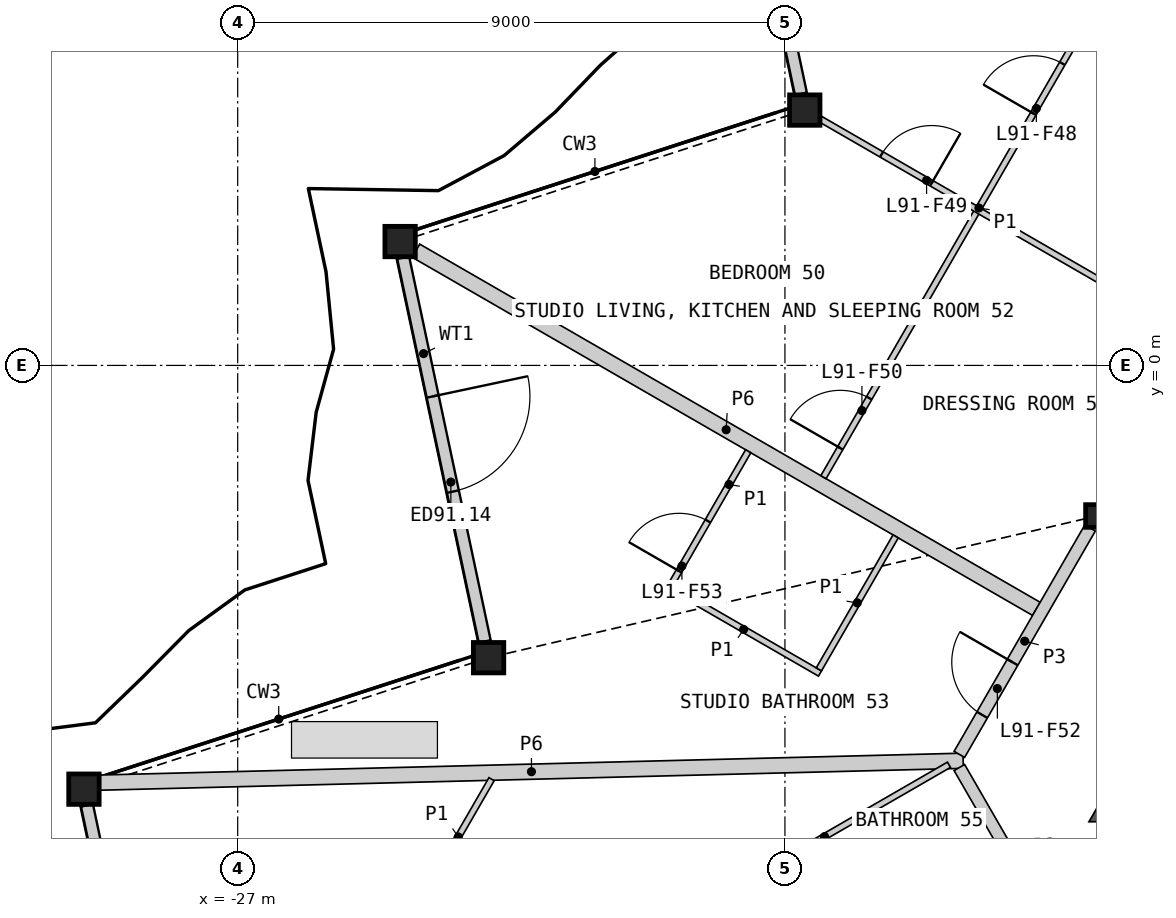
"""IFC4 building model, lengths in metres.
Left out: names, types, materials, properties, quantities, classifications, styles, units other than length and angle.
Written with IfcOpenShell. Run it as: python <this file> out.ifc"""

import sys

from ifc_helpers import new_model, si_unit, direction, frame, frame_2d, origin, origin_2d, place, context, subcontext, project, spatial, polyline, rectangle, hollow_rectangle, i_section, outline, extrude, element, fill, save


model = new_model("IFC4")
c1 = context("Model", 3, precision=1e-05, world=origin(), true_north=direction((0.0, 1.0)))
c2 = subcontext(c1, "Body", "Model", "MODEL_VIEW")
j1 = project(units=[si_unit("LENGTHUNIT", "METRE"), si_unit("PLANEANGLEUNIT", "RADIAN")], contexts=[c1])
p1 = place(None, origin())
s1 = spatial("IfcSite", under=j1, at=p1, CompositionType="ELEMENT")
p2 = place(p1, origin())
s2 = spatial("IfcBuilding", under=s1, at=p2, CompositionType="ELEMENT")
p3 = place(p2, frame((0.0, 0.0, 398.4)))
s3 = spatial("IfcBuildingStorey", under=s2, at=p3, CompositionType="ELEMENT", Elevation=398.4)
for number, where, z_axis, x_axis in (
    (1, (-17.674, 4.199, 0.0), (0.0, 0.0, 1.0), (1.0, 0.0, 0.0)),
    (2, (-24.329, 2.037, 0.0), (0.0, 0.0, 1.0), (1.0, 0.0, 0.0)),
    (3, (-22.874, -4.807, 0.0), (0.0, 0.0, 1.0), (1.0, 0.0, 0.0)),
    (4, (-29.529, -6.969, 0.0), (0.0, 0.0, 1.0), (1.0, 0.0, 0.0)),
):
    element("IfcColumn", number, at=place(p3, frame(where, z_axis=z_axis, x_axis=x_axis)), inside=s3, PredefinedType="COLUMN", context=c2, shape_type="SweptSolid", body=[
        extrude(hollow_rectangle(XDim=0.5, YDim=0.5, WallThickness=0.03, at=origin_2d()), origin(), (0.0, 0.0, 1.0), 3.4),
    ])
p4 = place(p3, frame((-12.868, -2.476, 0.0), z_axis=(0.0, 0.0, 1.0), x_axis=(1.0, 0.0, 0.0)))
e5 = element("IfcColumn", 5, at=p4, inside=s3, PredefinedType="COLUMN", context=c2, shape_type="SweptSolid", body=[
    extrude(i_section(OverallWidth=0.374, OverallDepth=0.372, WebThickness=0.016, FlangeThickness=0.026, at=origin_2d()), origin(), (0.0, 0.0, 1.0), 3.4),
])
p5 = place(p3, frame((-19.079, 10.778, 0.0), z_axis=(0.0, 0.0, 1.0), x_axis=(0.207888166349, -0.978152600718, 0.0)))
e6 = element("IfcWall", 6, at=p5, inside=s3, PredefinedType="SOLIDWALL", context=c2, shape_type="SweptSolid", body=[
    extrude(rectangle(XDim=6.453, YDim=0.2, at=frame_2d((3.227, 0.0))), origin(), (0.0, 0.0, 1.0), 2.634),
])
p6 = place(p5, frame((2.333, 0.0, 0.0)))
e7 = element("IfcOpeningElement", 7, at=p6, cuts=e6, PredefinedType="OPENING", context=c2, shape_type="SweptSolid", body=[
    extrude(rectangle(XDim=1.6, YDim=2.25, at=frame_2d((0.8, 1.125))), frame((0.0, 0.11, 0.0), z_axis=(0.0, -1.0, 0.0), x_axis=(1.0, 0.0, 0.0)), (0.0, 0.0, 1.0), 0.22),
])
p7 = place(p3, frame((-24.279, 1.772, 0.0), z_axis=(0.0, 0.0, 1.0), x_axis=(0.207924363149, -0.978144907061, 0.0)))
e8 = element("IfcWall", 8, at=p7, inside=s3, PredefinedType="SOLIDWALL", context=c2, shape_type="SweptSolid", body=[
    extrude(rectangle(XDim=6.453, YDim=0.2, at=frame_2d((3.227, 0.0))), origin(), (0.0, 0.0, 1.0), 2.634),
])
p8 = place(p7, frame((2.333, 0.0, 0.0)))
e9 = element("IfcOpeningElement", 9, at=p8, cuts=e8, PredefinedType="OPENING", context=c2, shape_type="SweptSolid", body=[
    extrude(rectangle(XDim=1.6, YDim=2.25, at=frame_2d((0.8, 1.125))), frame((0.0, 0.11, 0.0), z_axis=(0.0, -1.0, 0.0), x_axis=(1.0, 0.0, 0.0)), (0.0, 0.0, 1.0), 0.22),
])
p9 = place(p3, frame((-29.479, -7.235, 0.0), z_axis=(0.0, 0.0, 1.0), x_axis=(0.207932057694, -0.978143271399, 0.0)))
e10 = element("IfcWall", 10, at=p9, inside=s3, PredefinedType="SOLIDWALL", context=c2, shape_type="SweptSolid", body=[
    extrude(rectangle(XDim=6.453, YDim=0.2, at=frame_2d((3.227, 0.0))), origin(), (0.0, 0.0, 1.0), 2.634),
])
p10 = place(p9, frame((2.333, 0.0, 0.0)))
e11 = element("IfcOpeningElement", 11, at=p10, cuts=e10, PredefinedType="OPENING", context=c2, shape_type="SweptSolid", body=[
    extrude(rectangle(XDim=1.6, YDim=2.25, at=frame_2d((0.8, 1.125))), frame((0.0, 0.11, 0.0), z_axis=(0.0, -1.0, 0.0), x_axis=(1.0, 0.0, 0.0)), (0.0, 0.0, 1.0), 0.22),
])
p11 = place(p3, origin())
e12 = element("IfcWall", 12, at=p11, inside=s3, PredefinedType="SHEAR", context=c2, shape_type="SweptSolid", body=[
    extrude(outline(polyline([(-12.48, -6.606), (-11.961, -6.906), (-11.961, -7.506), (-13.0, -7.506), (-12.48, -6.606)])), origin(), (0.0, 0.0, 1.0), 3.1),
])
p12 = place(p3, frame((-29.269, -6.862, 0.0), z_axis=(0.0, 0.0, 1.0), x_axis=(0.999679020594, 0.025334872878, 0.0)))
e13 = element("IfcWall", 13, at=p12, inside=s3, PredefinedType="PARTITIONING", context=c2, shape_type="SweptSolid", body=[
    extrude(rectangle(XDim=14.204, YDim=0.25, at=frame_2d((7.102, 0.0))), origin(), (0.0, 0.0, 1.0), 2.33),
])
p13 = place(p3, frame((-24.069, 1.887, 0.0), z_axis=(0.0, 0.0, 1.0), x_axis=(0.866023404247, -0.500003463284, 0.0)))
e14 = element("IfcWall", 14, at=p13, inside=s3, PredefinedType="PARTITIONING", context=c2, shape_type="SweptSolid", body=[
    extrude(rectangle(XDim=11.782, YDim=0.25, at=frame_2d((5.891, 0.0))), origin(), (0.0, 0.0, 1.0), 2.33),
])
p14 = place(p3, frame((-15.131, -6.397, 0.0), z_axis=(0.0, 0.0, 1.0), x_axis=(0.499986217557, 0.866033360935, 0.0)))
e15 = element("IfcWall", 15, at=p14, inside=s3, PredefinedType="PARTITIONING", context=c2, shape_type="SweptSolid", body=[
    extrude(rectangle(XDim=4.3, YDim=0.2, at=frame_2d((2.15, 0.0))), origin(), (0.0, 0.0, 1.0), 3.1),
])
p15 = place(p14, frame((0.75, 0.0, 0.0)))
e16 = element("IfcOpeningElement", 16, at=p15, cuts=e15, PredefinedType="OPENING", context=c2, shape_type="SweptSolid", body=[
    extrude(rectangle(XDim=1.0, YDim=2.1, at=frame_2d((0.5, 1.05))), frame((0.0, 0.11, 0.0), z_axis=(0.0, -1.0, 0.0), x_axis=(1.0, 0.0, 0.0)), (0.0, 0.0, 1.0), 0.22),
])
p16 = place(p3, frame((-15.131, -6.614, 0.0), z_axis=(0.0, 0.0, 1.0), x_axis=(0.499967746641, -0.866044024469, 0.0)))
e17 = element("IfcWall", 17, at=p16, inside=s3, PredefinedType="PARTITIONING", context=c2, shape_type="SweptSolid", body=[
    extrude(rectangle(XDim=3.676, YDim=0.2, at=frame_2d((1.838, 0.0))), origin(), (0.0, 0.0, 1.0), 3.1),
])
p17 = place(p16, frame((2.426, 0.0, 0.0)))
e18 = element("IfcOpeningElement", 18, at=p17, cuts=e17, PredefinedType="OPENING", context=c2, shape_type="SweptSolid", body=[
    extrude(rectangle(XDim=1.0, YDim=2.1, at=frame_2d((0.5, 1.05))), frame((0.0, 0.11, 0.0), z_axis=(0.0, -1.0, 0.0), x_axis=(1.0, 0.0, 0.0)), (0.0, 0.0, 1.0), 0.22),
])
p18 = place(p3, frame((-18.869, 10.894, 0.0), z_axis=(0.0, 0.0, 1.0), x_axis=(0.866023724155, -0.500002909193, 0.0)))
e19 = element("IfcWall", 19, at=p18, inside=s3, PredefinedType="PARTITIONING", context=c2, shape_type="SweptSolid", body=[
    extrude(rectangle(XDim=11.655, YDim=0.1, at=frame_2d((5.827, 0.0))), origin(), (0.0, 0.0, 1.0), 2.33),
])
p19 = place(p18, frame((6.453, 0.0, 0.0)))
e20 = element("IfcOpeningElement", 20, at=p19, cuts=e19, PredefinedType="OPENING", context=c2, shape_type="SweptSolid", body=[
    extrude(rectangle(XDim=0.95, YDim=2.1, at=frame_2d((0.475, 1.05))), frame((0.0, 0.06, 0.0), z_axis=(0.0, -1.0, 0.0), x_axis=(1.0, 0.0, 0.0)), (0.0, 0.0, 1.0), 0.12),
])
p20 = place(p3, frame((-17.366, -1.838, 0.0), z_axis=(0.0, 0.0, 1.0), x_axis=(0.499998717582, 0.866026144187, 0.0)))
e21 = element("IfcWall", 21, at=p20, inside=s3, PredefinedType="PARTITIONING", context=c2, shape_type="SweptSolid", body=[
    extrude(rectangle(XDim=10.225, YDim=0.1, at=frame_2d((5.113, 0.0))), origin(), (0.0, 0.0, 1.0), 2.33),
])
p21 = place(p20, frame((6.907, 0.0, 0.0)))
e22 = element("IfcOpeningElement", 22, at=p21, cuts=e21, PredefinedType="OPENING", context=c2, shape_type="SweptSolid", body=[
    extrude(rectangle(XDim=0.95, YDim=2.1, at=frame_2d((0.475, 1.05))), frame((0.0, 0.06, 0.0), z_axis=(0.0, -1.0, 0.0), x_axis=(1.0, 0.0, 0.0)), (0.0, 0.0, 1.0), 0.12),
])
p22 = place(p20, frame((0.552, 0.0, 0.0)))
e23 = element("IfcOpeningElement", 23, at=p22, cuts=e21, PredefinedType="OPENING", context=c2, shape_type="SweptSolid", body=[
    extrude(rectangle(XDim=0.95, YDim=2.1, at=frame_2d((0.475, 1.05))), frame((0.0, 0.06, 0.0), z_axis=(0.0, -1.0, 0.0), x_axis=(1.0, 0.0, 0.0)), (0.0, 0.0, 1.0), 0.12),
])
p23 = place(p3, frame((-17.414, 4.049, 0.0), z_axis=(0.0, 0.0, 1.0), x_axis=(0.866033839264, -0.499985389037, 0.0)))
e24 = element("IfcWall", 24, at=p23, inside=s3, PredefinedType="PARTITIONING", context=c2, shape_type="SweptSolid", body=[
    extrude(rectangle(XDim=7.1, YDim=0.1, at=frame_2d((3.55, 0.0))), origin(), (0.0, 0.0, 1.0), 2.33),
])
p24 = place(p23, frame((1.158, 0.0, 0.0)))
e25 = element("IfcOpeningElement", 25, at=p24, cuts=e24, PredefinedType="OPENING", context=c2, shape_type="SweptSolid", body=[
    extrude(rectangle(XDim=0.95, YDim=2.1, at=frame_2d((0.475, 1.05))), frame((0.0, 0.06, 0.0), z_axis=(0.0, -1.0, 0.0), x_axis=(1.0, 0.0, 0.0)), (0.0, 0.0, 1.0), 0.12),
])
p25 = place(p3, frame((-19.935, -3.617, 0.0), z_axis=(0.0, 0.0, 1.0), x_axis=(0.866032775405, -0.499987231761, 0.0)))
e26 = element("IfcWall", 26, at=p25, inside=s3, PredefinedType="PARTITIONING", context=c2, shape_type="SweptSolid", body=[
    extrude(rectangle(XDim=2.9, YDim=0.1, at=frame_2d((1.45, 0.0))), origin(), (0.0, 0.0, 1.0), 2.33),
])
p26 = place(p3, frame((-17.442, -4.999, 0.0), z_axis=(0.0, 0.0, 1.0), x_axis=(0.499976333282, 0.866039067339, 0.0)))
e27 = element("IfcWall", 27, at=p26, inside=s3, PredefinedType="PARTITIONING", context=c2, shape_type="SweptSolid", body=[
    extrude(rectangle(XDim=2.525, YDim=0.1, at=frame_2d((1.262, 0.0))), origin(), (0.0, 0.0, 1.0), 2.33),
])
p27 = place(p3, frame((-19.867, -3.599, 0.0), z_axis=(0.0, 0.0, 1.0), x_axis=(0.500048846702, 0.865997200291, 0.0)))
e28 = element("IfcWall", 28, at=p27, inside=s3, PredefinedType="PARTITIONING", context=c2, shape_type="SweptSolid", body=[
    extrude(rectangle(XDim=2.525, YDim=0.1, at=frame_2d((1.263, 0.0))), origin(), (0.0, 0.0, 1.0), 2.33),
])
p28 = place(p27, frame((0.25, 0.0, 0.0)))
e29 = element("IfcOpeningElement", 29, at=p28, cuts=e28, PredefinedType="OPENING", context=c2, shape_type="SweptSolid", body=[
    extrude(rectangle(XDim=0.95, YDim=2.1, at=frame_2d((0.475, 1.05))), frame((0.0, 0.06, 0.0), z_axis=(0.0, -1.0, 0.0), x_axis=(1.0, 0.0, 0.0)), (0.0, 0.0, 1.0), 0.12),
])
p29 = place(p3, frame((-17.575, -7.881, 0.0), z_axis=(0.0, 0.0, 1.0), x_axis=(0.866013657776, 0.500020344131, 0.0)))
e30 = element("IfcWall", 30, at=p29, inside=s3, PredefinedType="PARTITIONING", context=c2, shape_type="SweptSolid", body=[
    extrude(rectangle(XDim=2.625, YDim=0.1, at=frame_2d((1.312, 0.0))), origin(), (0.0, 0.0, 1.0), 2.33),
])
p30 = place(p3, frame((-23.922, -8.705, 0.0), z_axis=(0.0, 0.0, 1.0), x_axis=(0.50001794124, 0.866015045157, 0.0)))
e31 = element("IfcWall", 31, at=p30, inside=s3, PredefinedType="PARTITIONING", context=c2, shape_type="SweptSolid", body=[
    extrude(rectangle(XDim=2.193, YDim=0.1, at=frame_2d((1.097, 0.0))), origin(), (0.0, 0.0, 1.0), 2.33),
])
p31 = place(p8, origin())
e32 = element("IfcDoor", 32, at=p31, inside=s3, OperationType="DOUBLE_DOOR_SINGLE_SWING", PredefinedType="DOOR", context=c2, shape_type="SweptSolid", body=[
    extrude(rectangle(XDim=1.6, YDim=2.25, at=frame_2d((0.8, 1.125))), frame((0.0, 0.025, 0.0), z_axis=(0.0, -1.0, 0.0), x_axis=(1.0, 0.0, 0.0)), (0.0, 0.0, 1.0), 0.05),
])
fill(e9, e32)
p32 = place(p21, origin())
e33 = element("IfcDoor", 33, at=p32, inside=s3, OperationType="SINGLE_SWING_LEFT", PredefinedType="DOOR", context=c2, shape_type="SweptSolid", body=[
    extrude(rectangle(XDim=0.95, YDim=2.1, at=frame_2d((0.475, 1.05))), frame((0.0, 0.025, 0.0), z_axis=(0.0, -1.0, 0.0), x_axis=(1.0, 0.0, 0.0)), (0.0, 0.0, 1.0), 0.05),
])
fill(e22, e33)
p33 = place(p24, origin())
e34 = element("IfcDoor", 34, at=p33, inside=s3, OperationType="SINGLE_SWING_RIGHT", PredefinedType="DOOR", context=c2, shape_type="SweptSolid", body=[
    extrude(rectangle(XDim=0.95, YDim=2.1, at=frame_2d((0.475, 1.05))), frame((0.0, 0.025, 0.0), z_axis=(0.0, -1.0, 0.0), x_axis=(1.0, 0.0, 0.0)), (0.0, 0.0, 1.0), 0.05),
])
fill(e25, e34)
p34 = place(p22, origin())
e35 = element("IfcDoor", 35, at=p34, inside=s3, OperationType="SINGLE_SWING_LEFT", PredefinedType="DOOR", context=c2, shape_type="SweptSolid", body=[
    extrude(rectangle(XDim=0.95, YDim=2.1, at=frame_2d((0.475, 1.05))), frame((0.0, 0.025, 0.0), z_axis=(0.0, -1.0, 0.0), x_axis=(1.0, 0.0, 0.0)), (0.0, 0.0, 1.0), 0.05),
])
fill(e23, e35)
p35 = place(p15, origin())
e36 = element("IfcDoor", 36, at=p35, inside=s3, OperationType="SINGLE_SWING_RIGHT", PredefinedType="DOOR", context=c2, shape_type="SweptSolid", body=[
    extrude(rectangle(XDim=1.0, YDim=2.1, at=frame_2d((0.5, 1.05))), frame((0.0, 0.025, 0.0), z_axis=(0.0, -1.0, 0.0), x_axis=(1.0, 0.0, 0.0)), (0.0, 0.0, 1.0), 0.05),
])
fill(e16, e36)
p36 = place(p28, origin())
e37 = element("IfcDoor", 37, at=p36, inside=s3, OperationType="SINGLE_SWING_LEFT", PredefinedType="DOOR", context=c2, shape_type="SweptSolid", body=[
    extrude(rectangle(XDim=0.95, YDim=2.1, at=frame_2d((0.475, 1.05))), frame((0.0, 0.025, 0.0), z_axis=(0.0, -1.0, 0.0), x_axis=(1.0, 0.0, 0.0)), (0.0, 0.0, 1.0), 0.05),
])
fill(e29, e37)
save(model, sys.argv[1])
